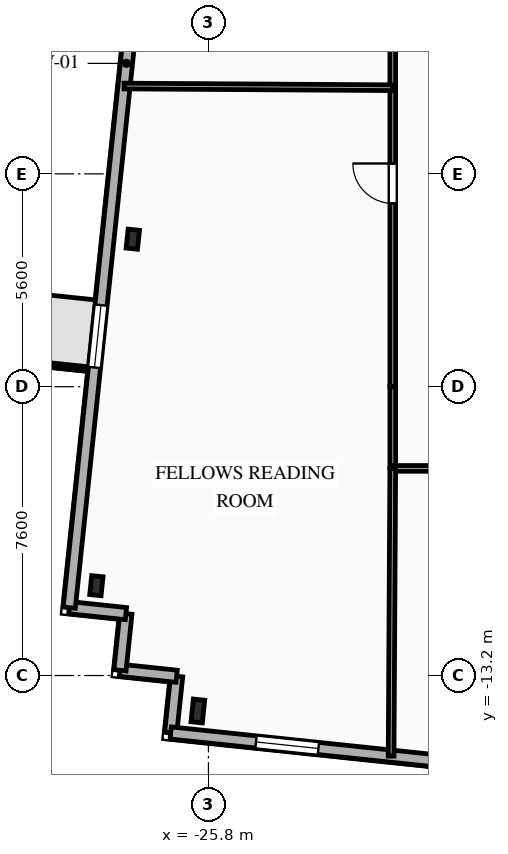
"""IFC4 building model, lengths in metres.
Left out: names, types, materials, properties, quantities, classifications, styles, units other than length and angle.
Written with IfcOpenShell. Run it as: python <this file> out.ifc"""

import sys

from ifc_helpers import new_model, si_unit, direction, frame, frame_2d, origin, origin_2d, place, context, subcontext, project, spatial, rectangle, i_section, extrude, element, fill, save


model = new_model("IFC4")
c1 = context("Model", 3, precision=1e-05, world=origin(), true_north=direction((0.0, 1.0)))
c2 = subcontext(c1, "Body", "Model", "MODEL_VIEW")
j1 = project(units=[si_unit("LENGTHUNIT", "METRE"), si_unit("PLANEANGLEUNIT", "RADIAN")], contexts=[c1])
p1 = place(None, origin())
s1 = spatial("IfcSite", under=j1, at=p1, CompositionType="ELEMENT")
p2 = place(p1, origin())
s2 = spatial("IfcBuilding", under=s1, at=p2, CompositionType="ELEMENT")
p3 = place(p2, frame((0.0, 0.0, 193.05)))
s3 = spatial("IfcBuildingStorey", under=s2, at=p3, CompositionType="ELEMENT", Elevation=193.05)
p4 = place(p3, frame((-26.079, -14.133, 0.0), z_axis=(0.0, 0.0, 1.0), x_axis=(0.994521895368, -0.104528463268, 0.0)))
e1 = element("IfcColumn", 1, at=p4, inside=s3, PredefinedType="COLUMN", context=c2, shape_type="SweptSolid", body=[
    extrude(i_section(OverallWidth=0.3, OverallDepth=0.6, WebThickness=0.015, FlangeThickness=0.03, FilletRadius=0.027, at=origin_2d()), origin(), (0.0, 0.0, 1.0), 3.35),
])
for number, where, z_axis, x_axis in (
    (2, (-27.791, -1.719, 0.0), (0.0, 0.0, 1.0), (0.995, -0.105, 0.0)),
    (3, (-28.749, -10.835, 0.0), (0.0, 0.0, 1.0), (0.995, -0.105, 0.0)),
):
    element("IfcColumn", number, at=place(p3, frame(where, z_axis=z_axis, x_axis=x_axis)), inside=s3, PredefinedType="COLUMN", context=c2, shape_type="SweptSolid", body=[
        extrude(i_section(OverallWidth=0.3, OverallDepth=0.5, WebThickness=0.014, FlangeThickness=0.028, FilletRadius=0.027, at=origin_2d()), origin(), (0.0, 0.0, 1.0), 3.35),
    ])
for number, where, z_axis, x_axis in (
    (4, (-26.793, -14.711, 0.0), (0.0, 0.0, 1.0), (0.104, 0.995, 0.0)),
    (5, (-26.637, -13.219, 0.0), (0.0, 0.0, 1.0), (-0.995, 0.104, 0.0)),
):
    element("IfcWall", number, at=place(p3, frame(where, z_axis=z_axis, x_axis=x_axis)), inside=s3, PredefinedType="SOLIDWALL", context=c2, shape_type="SweptSolid", body=[
        extrude(rectangle(XDim=1.5, YDim=0.32, at=frame_2d((0.75, 0.0))), origin(), (0.0, 0.0, 1.0), 3.04),
    ])
p5 = place(p3, frame((-28.128, -13.062, 0.0), z_axis=(0.0, 0.0, 1.0), x_axis=(0.104481464157, 0.994526834051, 0.0)))
e6 = element("IfcWall", 6, at=p5, inside=s3, PredefinedType="SOLIDWALL", context=c2, shape_type="SweptSolid", body=[
    extrude(rectangle(XDim=1.5, YDim=0.32, at=frame_2d((0.75, 0.0))), origin(), (0.0, 0.0, 1.0), 3.04),
])
p6 = place(p3, frame((-27.972, -11.571, 0.0), z_axis=(0.0, 0.0, 1.0), x_axis=(-0.994525057048, 0.104498377516, 0.0)))
e7 = element("IfcWall", 7, at=p6, inside=s3, PredefinedType="SOLIDWALL", context=c2, shape_type="SweptSolid", body=[
    extrude(rectangle(XDim=1.5, YDim=0.32, at=frame_2d((0.75, 0.0))), origin(), (0.0, 0.0, 1.0), 3.04),
])
p7 = place(p3, frame((-29.463, -11.414, 0.0), z_axis=(0.0, 0.0, 1.0), x_axis=(0.104530779244, 0.994521651947, 0.0)))
e8 = element("IfcWall", 8, at=p7, inside=s3, PredefinedType="SOLIDWALL", context=c2, shape_type="SweptSolid", body=[
    extrude(rectangle(XDim=28.8, YDim=0.32, at=frame_2d((14.4, 0.0))), origin(), (0.0, 0.0, 1.0), 3.04),
])
p8 = place(p7, frame((6.355, 0.0, 0.85)))
e9 = element("IfcOpeningElement", 9, at=p8, cuts=e8, PredefinedType="OPENING", context=c2, shape_type="SweptSolid", body=[
    extrude(rectangle(XDim=1.65, YDim=1.85, at=frame_2d((0.825, 0.925))), frame((0.0, 0.17, 0.0), z_axis=(0.0, -1.0, 0.0), x_axis=(1.0, 0.0, 0.0)), (0.0, 0.0, 1.0), 0.34),
])
p9 = place(p7, frame((20.314, 0.0, 0.85)))
e10 = element("IfcOpeningElement", 10, at=p9, cuts=e8, PredefinedType="OPENING", context=c2, shape_type="SweptSolid", body=[
    extrude(rectangle(XDim=1.65, YDim=1.85, at=frame_2d((0.825, 0.925))), frame((0.0, 0.17, 0.0), z_axis=(0.0, -1.0, 0.0), x_axis=(1.0, 0.0, 0.0)), (0.0, 0.0, 1.0), 0.34),
])
p10 = place(p3, frame((18.756, -19.498, 0.0), z_axis=(0.0, 0.0, 1.0), x_axis=(-0.994522060044, 0.104526896475, 0.0)))
e11 = element("IfcWall", 11, at=p10, inside=s3, PredefinedType="SOLIDWALL", context=c2, shape_type="SweptSolid", body=[
    extrude(rectangle(XDim=45.8, YDim=0.32, at=frame_2d((22.9, 0.0))), origin(), (0.0, 0.0, 1.0), 3.04),
])
p11 = place(p10, frame((3.018, 0.0, 0.85)))
e12 = element("IfcOpeningElement", 12, at=p11, cuts=e11, PredefinedType="OPENING", context=c2, shape_type="SweptSolid", body=[
    extrude(rectangle(XDim=1.65, YDim=1.85, at=frame_2d((0.825, 0.925))), frame((0.0, 0.17, 0.0), z_axis=(0.0, -1.0, 0.0), x_axis=(1.0, 0.0, 0.0)), (0.0, 0.0, 1.0), 0.34),
])
p12 = place(p10, frame((8.949, 0.0, 0.85)))
e13 = element("IfcOpeningElement", 13, at=p12, cuts=e11, PredefinedType="OPENING", context=c2, shape_type="SweptSolid", body=[
    extrude(rectangle(XDim=2.2, YDim=1.85, at=frame_2d((1.1, 0.925))), frame((0.0, 0.17, 0.0), z_axis=(0.0, -1.0, 0.0), x_axis=(1.0, 0.0, 0.0)), (0.0, 0.0, 1.0), 0.34),
])
p13 = place(p10, frame((17.356, 0.0, 0.85)))
e14 = element("IfcOpeningElement", 14, at=p13, cuts=e11, PredefinedType="OPENING", context=c2, shape_type="SweptSolid", body=[
    extrude(rectangle(XDim=2.2, YDim=1.85, at=frame_2d((1.1, 0.925))), frame((0.0, 0.17, 0.0), z_axis=(0.0, -1.0, 0.0), x_axis=(1.0, 0.0, 0.0)), (0.0, 0.0, 1.0), 0.34),
])
p14 = place(p10, frame((25.763, 0.0, 0.85)))
e15 = element("IfcOpeningElement", 15, at=p14, cuts=e11, PredefinedType="OPENING", context=c2, shape_type="SweptSolid", body=[
    extrude(rectangle(XDim=2.2, YDim=1.85, at=frame_2d((1.1, 0.925))), frame((0.0, 0.17, 0.0), z_axis=(0.0, -1.0, 0.0), x_axis=(1.0, 0.0, 0.0)), (0.0, 0.0, 1.0), 0.34),
])
p15 = place(p10, frame((34.726, 0.0, 0.85)))
e16 = element("IfcOpeningElement", 16, at=p15, cuts=e11, PredefinedType="OPENING", context=c2, shape_type="SweptSolid", body=[
    extrude(rectangle(XDim=1.65, YDim=1.85, at=frame_2d((0.825, 0.925))), frame((0.0, 0.17, 0.0), z_axis=(0.0, -1.0, 0.0), x_axis=(1.0, 0.0, 0.0)), (0.0, 0.0, 1.0), 0.34),
])
p16 = place(p10, frame((41.892, 0.0, 0.85)))
e17 = element("IfcOpeningElement", 17, at=p16, cuts=e11, PredefinedType="OPENING", context=c2, shape_type="SweptSolid", body=[
    extrude(rectangle(XDim=1.65, YDim=1.85, at=frame_2d((0.825, 0.925))), frame((0.0, 0.17, 0.0), z_axis=(0.0, -1.0, 0.0), x_axis=(1.0, 0.0, 0.0)), (0.0, 0.0, 1.0), 0.34),
])
p17 = place(p3, frame((-20.95, -7.75, 0.0), z_axis=(0.0, 0.0, 1.0), x_axis=(0.0, 1.0, 0.0)))
e18 = element("IfcWall", 18, at=p17, inside=s3, PredefinedType="PARTITIONING", context=c2, shape_type="SweptSolid", body=[
    extrude(rectangle(XDim=2.15, YDim=0.15, at=frame_2d((1.075, 0.0))), origin(), (0.0, 0.0, 1.0), 3.04),
])
p18 = place(p3, frame((-12.07, -7.75, 0.0), z_axis=(0.0, 0.0, 1.0), x_axis=(-1.0, 0.0, 0.0)))
e19 = element("IfcWall", 19, at=p18, inside=s3, PredefinedType="PARTITIONING", context=c2, shape_type="SweptSolid", body=[
    extrude(rectangle(XDim=8.88, YDim=0.15, at=frame_2d((4.44, 0.0))), origin(), (0.0, 0.0, 1.0), 3.04),
])
p19 = place(p18, frame((1.414, 0.0, 0.0)))
e20 = element("IfcOpeningElement", 20, at=p19, cuts=e19, PredefinedType="OPENING", context=c2, shape_type="SweptSolid", body=[
    extrude(rectangle(XDim=1.05, YDim=2.15, at=frame_2d((0.525, 1.075))), frame((0.0, 0.085, 0.0), z_axis=(0.0, -1.0, 0.0), x_axis=(1.0, 0.0, 0.0)), (0.0, 0.0, 1.0), 0.17),
])
p20 = place(p3, frame((-20.95, -5.6, 0.0), z_axis=(0.0, 0.0, 1.0), x_axis=(0.0, 1.0, 0.0)))
e21 = element("IfcWall", 21, at=p20, inside=s3, PredefinedType="PARTITIONING", context=c2, shape_type="SweptSolid", body=[
    extrude(rectangle(XDim=7.867, YDim=0.15, at=frame_2d((3.934, 0.0))), origin(), (0.0, 0.0, 1.0), 3.04),
])
p21 = place(p20, frame((4.823, 0.0, 0.0)))
e22 = element("IfcOpeningElement", 22, at=p21, cuts=e21, PredefinedType="OPENING", context=c2, shape_type="SweptSolid", body=[
    extrude(rectangle(XDim=1.05, YDim=2.15, at=frame_2d((0.525, 1.075))), frame((0.0, 0.085, 0.0), z_axis=(0.0, -1.0, 0.0), x_axis=(1.0, 0.0, 0.0)), (0.0, 0.0, 1.0), 0.17),
])
p22 = place(p3, frame((-20.95, 2.267, 0.0), z_axis=(0.0, 0.0, 1.0), x_axis=(0.0, 1.0, 0.0)))
e23 = element("IfcWall", 23, at=p22, inside=s3, PredefinedType="PARTITIONING", context=c2, shape_type="SweptSolid", body=[
    extrude(rectangle(XDim=6.233, YDim=0.15, at=frame_2d((3.116, 0.0))), origin(), (0.0, 0.0, 1.0), 3.04),
])
p23 = place(p22, frame((1.083, 0.0, 0.0)))
e24 = element("IfcOpeningElement", 24, at=p23, cuts=e23, PredefinedType="OPENING", context=c2, shape_type="SweptSolid", body=[
    extrude(rectangle(XDim=1.05, YDim=2.15, at=frame_2d((0.525, 1.075))), frame((0.0, 0.085, 0.0), z_axis=(0.0, -1.0, 0.0), x_axis=(1.0, 0.0, 0.0)), (0.0, 0.0, 1.0), 0.17),
])
p24 = place(p3, frame((-28.021, 2.311, 0.0), z_axis=(0.0, 0.0, 1.0), x_axis=(0.99998090118, -0.006180394355, 0.0)))
e25 = element("IfcWall", 25, at=p24, inside=s3, PredefinedType="PARTITIONING", context=c2, shape_type="SweptSolid", body=[
    extrude(rectangle(XDim=7.071, YDim=0.15, at=frame_2d((3.536, 0.0))), origin(), (0.0, 0.0, 1.0), 3.04),
])
p25 = place(p3, frame((-20.95, -7.75, 0.0), z_axis=(0.0, 0.0, 1.0), x_axis=(-0.005804668564, -0.99998315277, 0.0)))
e26 = element("IfcWall", 26, at=p25, inside=s3, PredefinedType="PARTITIONING", context=c2, shape_type="SweptSolid", body=[
    extrude(rectangle(XDim=7.571, YDim=0.15, at=frame_2d((3.785, 0.0))), origin(), (0.0, 0.0, 1.0), 3.04),
])
p26 = place(p8, origin())
e27 = element("IfcWindow", 27, at=p26, inside=s3, PartitioningType="SINGLE_PANEL", PredefinedType="WINDOW", context=c2, shape_type="SweptSolid", body=[
    extrude(rectangle(XDim=1.65, YDim=1.85, at=frame_2d((0.825, 0.925))), frame((0.0, 0.03, 0.0), z_axis=(0.0, -1.0, 0.0), x_axis=(1.0, 0.0, 0.0)), (0.0, 0.0, 1.0), 0.06),
])
fill(e9, e27)
p27 = place(p16, origin())
e28 = element("IfcWindow", 28, at=p27, inside=s3, PartitioningType="SINGLE_PANEL", PredefinedType="WINDOW", context=c2, shape_type="SweptSolid", body=[
    extrude(rectangle(XDim=1.65, YDim=1.85, at=frame_2d((0.825, 0.925))), frame((0.0, 0.03, 0.0), z_axis=(0.0, -1.0, 0.0), x_axis=(1.0, 0.0, 0.0)), (0.0, 0.0, 1.0), 0.06),
])
fill(e17, e28)
p28 = place(p21, origin())
e29 = element("IfcDoor", 29, at=p28, inside=s3, OperationType="SINGLE_SWING_RIGHT", PredefinedType="DOOR", context=c2, shape_type="SweptSolid", body=[
    extrude(rectangle(XDim=1.05, YDim=2.15, at=frame_2d((0.525, 1.075))), frame((0.0, 0.025, 0.0), z_axis=(0.0, -1.0, 0.0), x_axis=(1.0, 0.0, 0.0)), (0.0, 0.0, 1.0), 0.05),
])
fill(e22, e29)
save(model, sys.argv[1])
